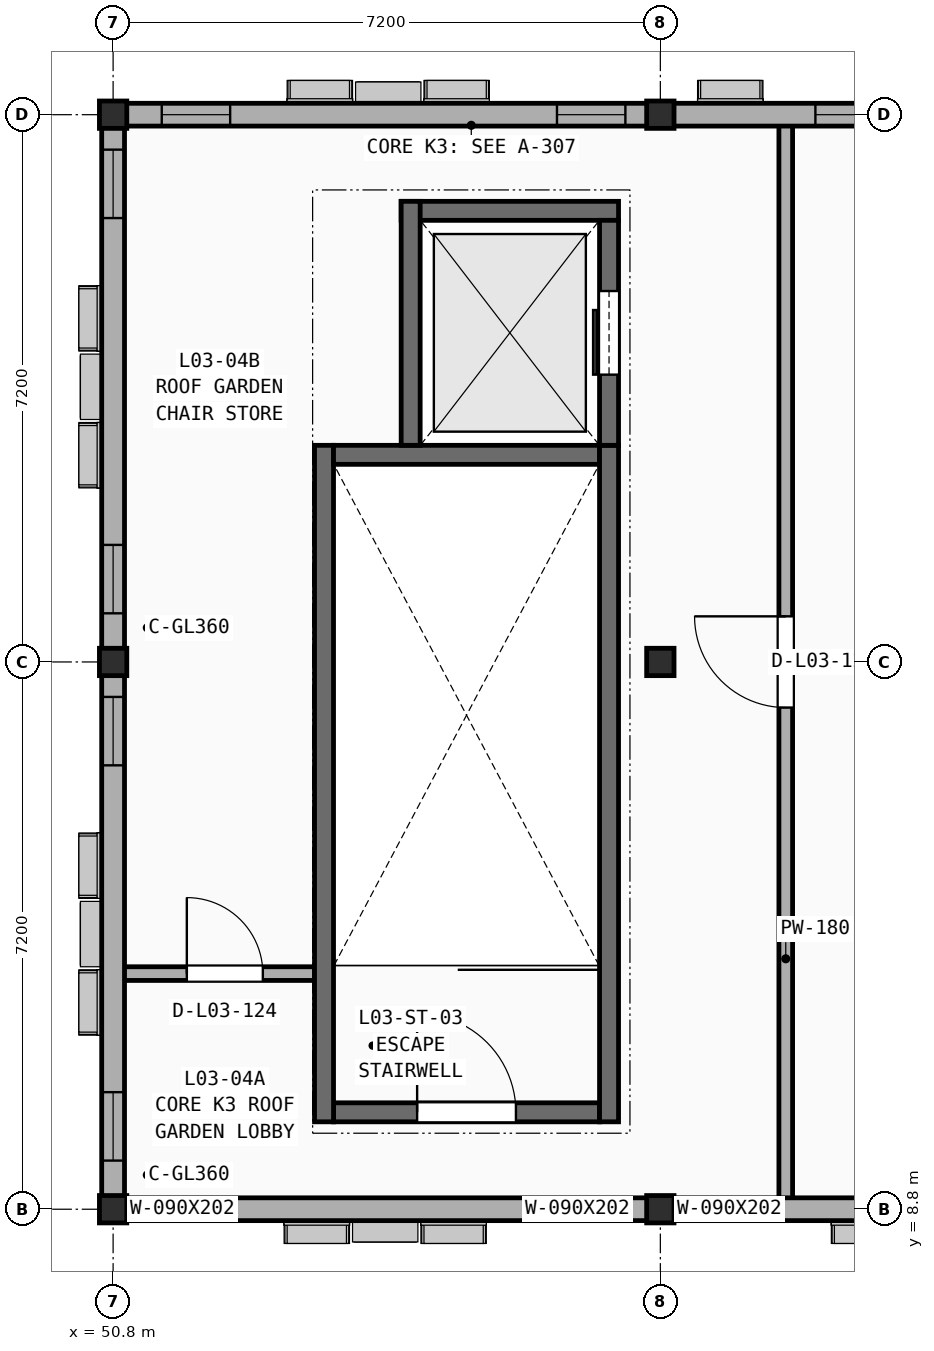
"""IFC4 building model, lengths in metres.
Left out: names, types, materials, properties, quantities, classifications, styles, units other than length and angle.
Written with IfcOpenShell. Run it as: python <this file> out.ifc"""

import sys

from ifc_helpers import new_model, si_unit, direction, frame, frame_2d, origin, origin_2d, place, context, subcontext, project, spatial, rectangle, extrude, element, fill, save


model = new_model("IFC4")
c1 = context("Model", 3, precision=1e-05, world=origin(), true_north=direction((0.0, 1.0)))
c2 = subcontext(c1, "Body", "Model", "MODEL_VIEW")
j1 = project(units=[si_unit("LENGTHUNIT", "METRE"), si_unit("PLANEANGLEUNIT", "RADIAN")], contexts=[c1])
p1 = place(None, origin())
s1 = spatial("IfcSite", under=j1, at=p1, CompositionType="ELEMENT")
p2 = place(p1, origin())
s2 = spatial("IfcBuilding", under=s1, at=p2, CompositionType="ELEMENT")
p3 = place(p2, frame((0.0, 0.0, 13.8)))
s3 = spatial("IfcBuildingStorey", under=s2, at=p3, CompositionType="ELEMENT", Elevation=13.8)
for number, where, z_axis, x_axis in (
    (1, (50.8, 8.8, 0.0), (0.0, 0.0, 1.0), (1.0, 0.0, 0.0)),
    (2, (50.8, 16.0, 0.0), (0.0, 0.0, 1.0), (1.0, 0.0, 0.0)),
    (3, (50.8, 23.2, 0.0), (0.0, 0.0, 1.0), (1.0, 0.0, 0.0)),
    (4, (58.0, 8.8, 0.0), (0.0, 0.0, 1.0), (1.0, 0.0, 0.0)),
    (5, (58.0, 16.0, 0.0), (0.0, 0.0, 1.0), (1.0, 0.0, 0.0)),
    (6, (58.0, 23.2, 0.0), (0.0, 0.0, 1.0), (1.0, 0.0, 0.0)),
):
    element("IfcColumn", number, at=place(p3, frame(where, z_axis=z_axis, x_axis=x_axis)), inside=s3, PredefinedType="COLUMN", context=c2, shape_type="SweptSolid", body=[
        extrude(rectangle(XDim=0.36, YDim=0.36, at=origin_2d()), origin(), (0.0, 0.0, 1.0), 3.62),
    ])
p4 = place(p3, frame((50.94, 11.9, 0.0), z_axis=(0.0, 0.0, 1.0), x_axis=(1.0, 0.0, 0.0)))
e7 = element("IfcWall", 7, at=p4, inside=s3, PredefinedType="PARTITIONING", context=c2, shape_type="SweptSolid", body=[
    extrude(rectangle(XDim=2.66, YDim=0.18, at=frame_2d((1.33, 0.0))), origin(), (0.0, 0.0, 1.0), 3.09),
])
p5 = place(p4, frame((0.83, 0.0, -0.01)))
e8 = element("IfcOpeningElement", 8, at=p5, cuts=e7, PredefinedType="OPENING", context=c2, shape_type="SweptSolid", body=[
    extrude(rectangle(XDim=1.0, YDim=2.16, at=frame_2d((0.5, 1.08))), frame((0.0, 0.1, 0.0), z_axis=(0.0, -1.0, 0.0), x_axis=(1.0, 0.0, 0.0)), (0.0, 0.0, 1.0), 0.2),
])
p6 = place(p3, frame((59.65, 8.94, 0.0), z_axis=(0.0, 0.0, 1.0), x_axis=(0.0, 1.0, 0.0)))
e9 = element("IfcWall", 9, at=p6, inside=s3, PredefinedType="PARTITIONING", context=c2, shape_type="SweptSolid", body=[
    extrude(rectangle(XDim=14.12, YDim=0.18, at=frame_2d((7.06, 0.0))), origin(), (0.0, 0.0, 1.0), 3.01),
])
p7 = place(p6, frame((6.46, 0.0, -0.01)))
e10 = element("IfcOpeningElement", 10, at=p7, cuts=e9, PredefinedType="OPENING", context=c2, shape_type="SweptSolid", body=[
    extrude(rectangle(XDim=1.2, YDim=2.21, at=frame_2d((0.6, 1.105))), frame((0.0, 0.1, 0.0), z_axis=(0.0, -1.0, 0.0), x_axis=(1.0, 0.0, 0.0)), (0.0, 0.0, 1.0), 0.2),
])
p8 = place(p3, frame((50.8, 8.8, 0.0), z_axis=(0.0, 0.0, 1.0), x_axis=(1.0, 0.0, 0.0)))
e11 = element("IfcWall", 11, at=p8, inside=s3, PredefinedType="SOLIDWALL", context=c2, shape_type="SweptSolid", body=[
    extrude(rectangle(XDim=7.2, YDim=0.3, at=frame_2d((3.6, 0.0))), origin(), (0.0, 0.0, 1.0), 3.01),
])
p9 = place(p8, frame((0.46, 0.0, 0.85)))
e12 = element("IfcOpeningElement", 12, at=p9, cuts=e11, PredefinedType="OPENING", context=c2, shape_type="SweptSolid", body=[
    extrude(rectangle(XDim=0.9, YDim=2.02, at=frame_2d((0.45, 1.01))), frame((0.0, 0.16, 0.0), z_axis=(0.0, -1.0, 0.0), x_axis=(1.0, 0.0, 0.0)), (0.0, 0.0, 1.0), 0.32),
])
p10 = place(p8, frame((5.66, 0.0, 0.85)))
e13 = element("IfcOpeningElement", 13, at=p10, cuts=e11, PredefinedType="OPENING", context=c2, shape_type="SweptSolid", body=[
    extrude(rectangle(XDim=0.9, YDim=2.02, at=frame_2d((0.45, 1.01))), frame((0.0, 0.16, 0.0), z_axis=(0.0, -1.0, 0.0), x_axis=(1.0, 0.0, 0.0)), (0.0, 0.0, 1.0), 0.32),
])
p11 = place(p3, frame((58.0, 8.8, 0.0), z_axis=(0.0, 0.0, 1.0), x_axis=(1.0, 0.0, 0.0)))
e14 = element("IfcWall", 14, at=p11, inside=s3, PredefinedType="SOLIDWALL", context=c2, shape_type="SweptSolid", body=[
    extrude(rectangle(XDim=7.2, YDim=0.3, at=frame_2d((3.6, 0.0))), origin(), (0.0, 0.0, 1.0), 3.01),
])
p12 = place(p11, frame((0.46, 0.0, 0.85)))
e15 = element("IfcOpeningElement", 15, at=p12, cuts=e14, PredefinedType="OPENING", context=c2, shape_type="SweptSolid", body=[
    extrude(rectangle(XDim=0.9, YDim=2.02, at=frame_2d((0.45, 1.01))), frame((0.0, 0.16, 0.0), z_axis=(0.0, -1.0, 0.0), x_axis=(1.0, 0.0, 0.0)), (0.0, 0.0, 1.0), 0.32),
])
p13 = place(p11, frame((5.66, 0.0, 0.85)))
e16 = element("IfcOpeningElement", 16, at=p13, cuts=e14, PredefinedType="OPENING", context=c2, shape_type="SweptSolid", body=[
    extrude(rectangle(XDim=0.9, YDim=2.02, at=frame_2d((0.45, 1.01))), frame((0.0, 0.16, 0.0), z_axis=(0.0, -1.0, 0.0), x_axis=(1.0, 0.0, 0.0)), (0.0, 0.0, 1.0), 0.32),
])
p14 = place(p3, frame((65.2, 23.2, 0.0), z_axis=(0.0, 0.0, 1.0), x_axis=(-1.0, 0.0, 0.0)))
e17 = element("IfcWall", 17, at=p14, inside=s3, PredefinedType="SOLIDWALL", context=c2, shape_type="SweptSolid", body=[
    extrude(rectangle(XDim=7.2, YDim=0.3, at=frame_2d((3.6, 0.0))), origin(), (0.0, 0.0, 1.0), 3.01),
])
p15 = place(p14, frame((0.46, 0.0, 0.85)))
e18 = element("IfcOpeningElement", 18, at=p15, cuts=e17, PredefinedType="OPENING", context=c2, shape_type="SweptSolid", body=[
    extrude(rectangle(XDim=0.9, YDim=2.02, at=frame_2d((0.45, 1.01))), frame((0.0, 0.16, 0.0), z_axis=(0.0, -1.0, 0.0), x_axis=(1.0, 0.0, 0.0)), (0.0, 0.0, 1.0), 0.32),
])
p16 = place(p14, frame((4.26, 0.0, 0.85)))
e19 = element("IfcOpeningElement", 19, at=p16, cuts=e17, PredefinedType="OPENING", context=c2, shape_type="SweptSolid", body=[
    extrude(rectangle(XDim=0.9, YDim=2.02, at=frame_2d((0.45, 1.01))), frame((0.0, 0.16, 0.0), z_axis=(0.0, -1.0, 0.0), x_axis=(1.0, 0.0, 0.0)), (0.0, 0.0, 1.0), 0.32),
])
p17 = place(p3, frame((58.0, 23.2, 0.0), z_axis=(0.0, 0.0, 1.0), x_axis=(-1.0, 0.0, 0.0)))
e20 = element("IfcWall", 20, at=p17, inside=s3, PredefinedType="SOLIDWALL", context=c2, shape_type="SweptSolid", body=[
    extrude(rectangle(XDim=7.2, YDim=0.3, at=frame_2d((3.6, 0.0))), origin(), (0.0, 0.0, 1.0), 3.01),
])
p18 = place(p17, frame((0.46, 0.0, 0.85)))
e21 = element("IfcOpeningElement", 21, at=p18, cuts=e20, PredefinedType="OPENING", context=c2, shape_type="SweptSolid", body=[
    extrude(rectangle(XDim=0.9, YDim=2.02, at=frame_2d((0.45, 1.01))), frame((0.0, 0.16, 0.0), z_axis=(0.0, -1.0, 0.0), x_axis=(1.0, 0.0, 0.0)), (0.0, 0.0, 1.0), 0.32),
])
p19 = place(p17, frame((5.66, 0.0, 0.85)))
e22 = element("IfcOpeningElement", 22, at=p19, cuts=e20, PredefinedType="OPENING", context=c2, shape_type="SweptSolid", body=[
    extrude(rectangle(XDim=0.9, YDim=2.02, at=frame_2d((0.45, 1.01))), frame((0.0, 0.16, 0.0), z_axis=(0.0, -1.0, 0.0), x_axis=(1.0, 0.0, 0.0)), (0.0, 0.0, 1.0), 0.32),
])
p20 = place(p3, frame((50.8, 23.2, 0.0), z_axis=(0.0, 0.0, 1.0), x_axis=(0.0, -1.0, 0.0)))
e23 = element("IfcWall", 23, at=p20, inside=s3, PredefinedType="SOLIDWALL", context=c2, shape_type="SweptSolid", body=[
    extrude(rectangle(XDim=7.2, YDim=0.3, at=frame_2d((3.6, 0.0))), origin(), (0.0, 0.0, 1.0), 3.01),
])
p21 = place(p20, frame((0.46, 0.0, 0.85)))
e24 = element("IfcOpeningElement", 24, at=p21, cuts=e23, PredefinedType="OPENING", context=c2, shape_type="SweptSolid", body=[
    extrude(rectangle(XDim=0.9, YDim=2.02, at=frame_2d((0.45, 1.01))), frame((0.0, 0.16, 0.0), z_axis=(0.0, -1.0, 0.0), x_axis=(1.0, 0.0, 0.0)), (0.0, 0.0, 1.0), 0.32),
])
p22 = place(p20, frame((5.66, 0.0, 0.85)))
e25 = element("IfcOpeningElement", 25, at=p22, cuts=e23, PredefinedType="OPENING", context=c2, shape_type="SweptSolid", body=[
    extrude(rectangle(XDim=0.9, YDim=2.02, at=frame_2d((0.45, 1.01))), frame((0.0, 0.16, 0.0), z_axis=(0.0, -1.0, 0.0), x_axis=(1.0, 0.0, 0.0)), (0.0, 0.0, 1.0), 0.32),
])
p23 = place(p3, frame((50.8, 16.0, 0.0), z_axis=(0.0, 0.0, 1.0), x_axis=(0.0, -1.0, 0.0)))
e26 = element("IfcWall", 26, at=p23, inside=s3, PredefinedType="SOLIDWALL", context=c2, shape_type="SweptSolid", body=[
    extrude(rectangle(XDim=7.2, YDim=0.3, at=frame_2d((3.6, 0.0))), origin(), (0.0, 0.0, 1.0), 3.01),
])
p24 = place(p23, frame((0.46, 0.0, 0.85)))
e27 = element("IfcOpeningElement", 27, at=p24, cuts=e26, PredefinedType="OPENING", context=c2, shape_type="SweptSolid", body=[
    extrude(rectangle(XDim=0.9, YDim=2.02, at=frame_2d((0.45, 1.01))), frame((0.0, 0.16, 0.0), z_axis=(0.0, -1.0, 0.0), x_axis=(1.0, 0.0, 0.0)), (0.0, 0.0, 1.0), 0.32),
])
p25 = place(p23, frame((5.66, 0.0, 0.85)))
e28 = element("IfcOpeningElement", 28, at=p25, cuts=e26, PredefinedType="OPENING", context=c2, shape_type="SweptSolid", body=[
    extrude(rectangle(XDim=0.9, YDim=2.02, at=frame_2d((0.45, 1.01))), frame((0.0, 0.16, 0.0), z_axis=(0.0, -1.0, 0.0), x_axis=(1.0, 0.0, 0.0)), (0.0, 0.0, 1.0), 0.32),
])
p26 = place(p3, frame((53.7, 10.075, 0.0), z_axis=(0.0, 0.0, 1.0), x_axis=(1.0, 0.0, 0.0)))
e29 = element("IfcWall", 29, at=p26, inside=s3, PredefinedType="SHEAR", context=c2, shape_type="SweptSolid", body=[
    extrude(rectangle(XDim=3.5, YDim=0.25, at=frame_2d((1.75, 0.0))), origin(), (0.0, 0.0, 1.0), 3.9),
])
p27 = place(p26, frame((1.1, 0.0, -0.01)))
e30 = element("IfcOpeningElement", 30, at=p27, cuts=e29, PredefinedType="OPENING", context=c2, shape_type="SweptSolid", body=[
    extrude(rectangle(XDim=1.3, YDim=2.16, at=frame_2d((0.65, 1.08))), frame((0.0, 0.135, 0.0), z_axis=(0.0, -1.0, 0.0), x_axis=(1.0, 0.0, 0.0)), (0.0, 0.0, 1.0), 0.27),
])
p28 = place(p3, frame((53.575, 9.95, 0.0), z_axis=(0.0, 0.0, 1.0), x_axis=(0.0, 1.0, 0.0)))
e31 = element("IfcWall", 31, at=p28, inside=s3, PredefinedType="SHEAR", context=c2, shape_type="SweptSolid", body=[
    extrude(rectangle(XDim=8.9, YDim=0.25, at=frame_2d((4.45, 0.0))), origin(), (0.0, 0.0, 1.0), 3.9),
])
p29 = place(p3, frame((57.2, 18.725, 0.0), z_axis=(0.0, 0.0, 1.0), x_axis=(-1.0, 0.0, 0.0)))
e32 = element("IfcWall", 32, at=p29, inside=s3, PredefinedType="SHEAR", context=c2, shape_type="SweptSolid", body=[
    extrude(rectangle(XDim=3.5, YDim=0.25, at=frame_2d((1.75, 0.0))), origin(), (0.0, 0.0, 1.0), 3.9),
])
p30 = place(p3, frame((57.325, 9.95, 0.0), z_axis=(0.0, 0.0, 1.0), x_axis=(0.0, 1.0, 0.0)))
e33 = element("IfcWall", 33, at=p30, inside=s3, PredefinedType="SHEAR", context=c2, shape_type="SweptSolid", body=[
    extrude(rectangle(XDim=8.9, YDim=0.25, at=frame_2d((4.45, 0.0))), origin(), (0.0, 0.0, 1.0), 3.9),
])
p31 = place(p3, frame((54.59, 21.935, 0.0), z_axis=(0.0, 0.0, 1.0), x_axis=(1.0, 0.0, 0.0)))
e34 = element("IfcWall", 34, at=p31, inside=s3, PredefinedType="SHEAR", context=c2, shape_type="SweptSolid", body=[
    extrude(rectangle(XDim=2.86, YDim=0.25, at=frame_2d((1.43, 0.0))), origin(), (0.0, 0.0, 1.0), 3.9),
])
p32 = place(p3, frame((57.325, 18.85, 0.0), z_axis=(0.0, 0.0, 1.0), x_axis=(0.0, 1.0, 0.0)))
e35 = element("IfcWall", 35, at=p32, inside=s3, PredefinedType="SHEAR", context=c2, shape_type="SweptSolid", body=[
    extrude(rectangle(XDim=2.96, YDim=0.25, at=frame_2d((1.48, 0.0))), origin(), (0.0, 0.0, 1.0), 3.9),
])
p33 = place(p32, frame((0.93, 0.0, -0.01)))
e36 = element("IfcOpeningElement", 36, at=p33, cuts=e35, PredefinedType="OPENING", context=c2, shape_type="SweptSolid", body=[
    extrude(rectangle(XDim=1.1, YDim=2.16, at=frame_2d((0.55, 1.08))), frame((0.0, 0.135, 0.0), z_axis=(0.0, -1.0, 0.0), x_axis=(1.0, 0.0, 0.0)), (0.0, 0.0, 1.0), 0.27),
])
p34 = place(p3, frame((54.715, 18.85, 0.0), z_axis=(0.0, 0.0, 1.0), x_axis=(0.0, 1.0, 0.0)))
e37 = element("IfcWall", 37, at=p34, inside=s3, PredefinedType="SHEAR", context=c2, shape_type="SweptSolid", body=[
    extrude(rectangle(XDim=3.21, YDim=0.25, at=frame_2d((1.605, 0.0))), origin(), (0.0, 0.0, 1.0), 3.9),
])
p35 = place(p5, frame((0.0, 0.0, 0.01)))
e38 = element("IfcDoor", 38, at=p35, inside=s3, OperationType="SINGLE_SWING_LEFT", PredefinedType="DOOR", context=c2, shape_type="SweptSolid", body=[
    extrude(rectangle(XDim=1.0, YDim=2.15, at=frame_2d((0.5, 1.075))), frame((0.0, 0.025, 0.0), z_axis=(0.0, -1.0, 0.0), x_axis=(1.0, 0.0, 0.0)), (0.0, 0.0, 1.0), 0.05),
])
fill(e8, e38)
p36 = place(p7, frame((0.0, 0.0, 0.01)))
e39 = element("IfcDoor", 39, at=p36, inside=s3, OperationType="SINGLE_SWING_RIGHT", PredefinedType="DOOR", context=c2, shape_type="SweptSolid", body=[
    extrude(rectangle(XDim=1.2, YDim=2.2, at=frame_2d((0.6, 1.1))), frame((0.0, 0.025, 0.0), z_axis=(0.0, -1.0, 0.0), x_axis=(1.0, 0.0, 0.0)), (0.0, 0.0, 1.0), 0.05),
])
fill(e10, e39)
p37 = place(p9, origin())
e40 = element("IfcWindow", 40, at=p37, inside=s3, PartitioningType="SINGLE_PANEL", PredefinedType="WINDOW", context=c2, shape_type="SweptSolid", body=[
    extrude(rectangle(XDim=0.9, YDim=2.02, at=frame_2d((0.45, 1.01))), frame((0.0, 0.03, 0.0), z_axis=(0.0, -1.0, 0.0), x_axis=(1.0, 0.0, 0.0)), (0.0, 0.0, 1.0), 0.06),
])
fill(e12, e40)
p38 = place(p10, origin())
e41 = element("IfcWindow", 41, at=p38, inside=s3, PartitioningType="SINGLE_PANEL", PredefinedType="WINDOW", context=c2, shape_type="SweptSolid", body=[
    extrude(rectangle(XDim=0.9, YDim=2.02, at=frame_2d((0.45, 1.01))), frame((0.0, 0.03, 0.0), z_axis=(0.0, -1.0, 0.0), x_axis=(1.0, 0.0, 0.0)), (0.0, 0.0, 1.0), 0.06),
])
fill(e13, e41)
p39 = place(p12, origin())
e42 = element("IfcWindow", 42, at=p39, inside=s3, PartitioningType="SINGLE_PANEL", PredefinedType="WINDOW", context=c2, shape_type="SweptSolid", body=[
    extrude(rectangle(XDim=0.9, YDim=2.02, at=frame_2d((0.45, 1.01))), frame((0.0, 0.03, 0.0), z_axis=(0.0, -1.0, 0.0), x_axis=(1.0, 0.0, 0.0)), (0.0, 0.0, 1.0), 0.06),
])
fill(e15, e42)
p40 = place(p16, origin())
e43 = element("IfcWindow", 43, at=p40, inside=s3, PartitioningType="SINGLE_PANEL", PredefinedType="WINDOW", context=c2, shape_type="SweptSolid", body=[
    extrude(rectangle(XDim=0.9, YDim=2.02, at=frame_2d((0.45, 1.01))), frame((0.0, 0.03, 0.0), z_axis=(0.0, -1.0, 0.0), x_axis=(1.0, 0.0, 0.0)), (0.0, 0.0, 1.0), 0.06),
])
fill(e19, e43)
p41 = place(p18, origin())
e44 = element("IfcWindow", 44, at=p41, inside=s3, PartitioningType="SINGLE_PANEL", PredefinedType="WINDOW", context=c2, shape_type="SweptSolid", body=[
    extrude(rectangle(XDim=0.9, YDim=2.02, at=frame_2d((0.45, 1.01))), frame((0.0, 0.03, 0.0), z_axis=(0.0, -1.0, 0.0), x_axis=(1.0, 0.0, 0.0)), (0.0, 0.0, 1.0), 0.06),
])
fill(e21, e44)
p42 = place(p19, origin())
e45 = element("IfcWindow", 45, at=p42, inside=s3, PartitioningType="SINGLE_PANEL", PredefinedType="WINDOW", context=c2, shape_type="SweptSolid", body=[
    extrude(rectangle(XDim=0.9, YDim=2.02, at=frame_2d((0.45, 1.01))), frame((0.0, 0.03, 0.0), z_axis=(0.0, -1.0, 0.0), x_axis=(1.0, 0.0, 0.0)), (0.0, 0.0, 1.0), 0.06),
])
fill(e22, e45)
p43 = place(p21, origin())
e46 = element("IfcWindow", 46, at=p43, inside=s3, PartitioningType="SINGLE_PANEL", PredefinedType="WINDOW", context=c2, shape_type="SweptSolid", body=[
    extrude(rectangle(XDim=0.9, YDim=2.02, at=frame_2d((0.45, 1.01))), frame((0.0, 0.03, 0.0), z_axis=(0.0, -1.0, 0.0), x_axis=(1.0, 0.0, 0.0)), (0.0, 0.0, 1.0), 0.06),
])
fill(e24, e46)
p44 = place(p22, origin())
e47 = element("IfcWindow", 47, at=p44, inside=s3, PartitioningType="SINGLE_PANEL", PredefinedType="WINDOW", context=c2, shape_type="SweptSolid", body=[
    extrude(rectangle(XDim=0.9, YDim=2.02, at=frame_2d((0.45, 1.01))), frame((0.0, 0.03, 0.0), z_axis=(0.0, -1.0, 0.0), x_axis=(1.0, 0.0, 0.0)), (0.0, 0.0, 1.0), 0.06),
])
fill(e25, e47)
p45 = place(p24, origin())
e48 = element("IfcWindow", 48, at=p45, inside=s3, PartitioningType="SINGLE_PANEL", PredefinedType="WINDOW", context=c2, shape_type="SweptSolid", body=[
    extrude(rectangle(XDim=0.9, YDim=2.02, at=frame_2d((0.45, 1.01))), frame((0.0, 0.03, 0.0), z_axis=(0.0, -1.0, 0.0), x_axis=(1.0, 0.0, 0.0)), (0.0, 0.0, 1.0), 0.06),
])
fill(e27, e48)
p46 = place(p25, origin())
e49 = element("IfcWindow", 49, at=p46, inside=s3, PartitioningType="SINGLE_PANEL", PredefinedType="WINDOW", context=c2, shape_type="SweptSolid", body=[
    extrude(rectangle(XDim=0.9, YDim=2.02, at=frame_2d((0.45, 1.01))), frame((0.0, 0.03, 0.0), z_axis=(0.0, -1.0, 0.0), x_axis=(1.0, 0.0, 0.0)), (0.0, 0.0, 1.0), 0.06),
])
fill(e28, e49)
p47 = place(p27, frame((1.3, 0.0, 0.01), z_axis=(0.0, 0.0, 1.0), x_axis=(-1.0, 0.0, 0.0)))
e50 = element("IfcDoor", 50, at=p47, inside=s3, OperationType="SINGLE_SWING_LEFT", PredefinedType="DOOR", context=c2, shape_type="SweptSolid", body=[
    extrude(rectangle(XDim=1.3, YDim=2.15, at=frame_2d((0.65, 1.075))), frame((0.0, 0.025, 0.0), z_axis=(0.0, -1.0, 0.0), x_axis=(1.0, 0.0, 0.0)), (0.0, 0.0, 1.0), 0.05),
])
fill(e30, e50)
p48 = place(p33, frame((0.0, 0.0, 0.01)))
e51 = element("IfcDoor", 51, at=p48, inside=s3, OperationType="SLIDING_TO_LEFT", PredefinedType="DOOR", context=c2, shape_type="SweptSolid", body=[
    extrude(rectangle(XDim=1.1, YDim=2.15, at=frame_2d((0.55, 1.075))), frame((0.0, 0.025, 0.0), z_axis=(0.0, -1.0, 0.0), x_axis=(1.0, 0.0, 0.0)), (0.0, 0.0, 1.0), 0.05),
])
fill(e36, e51)
save(model, sys.argv[1])
